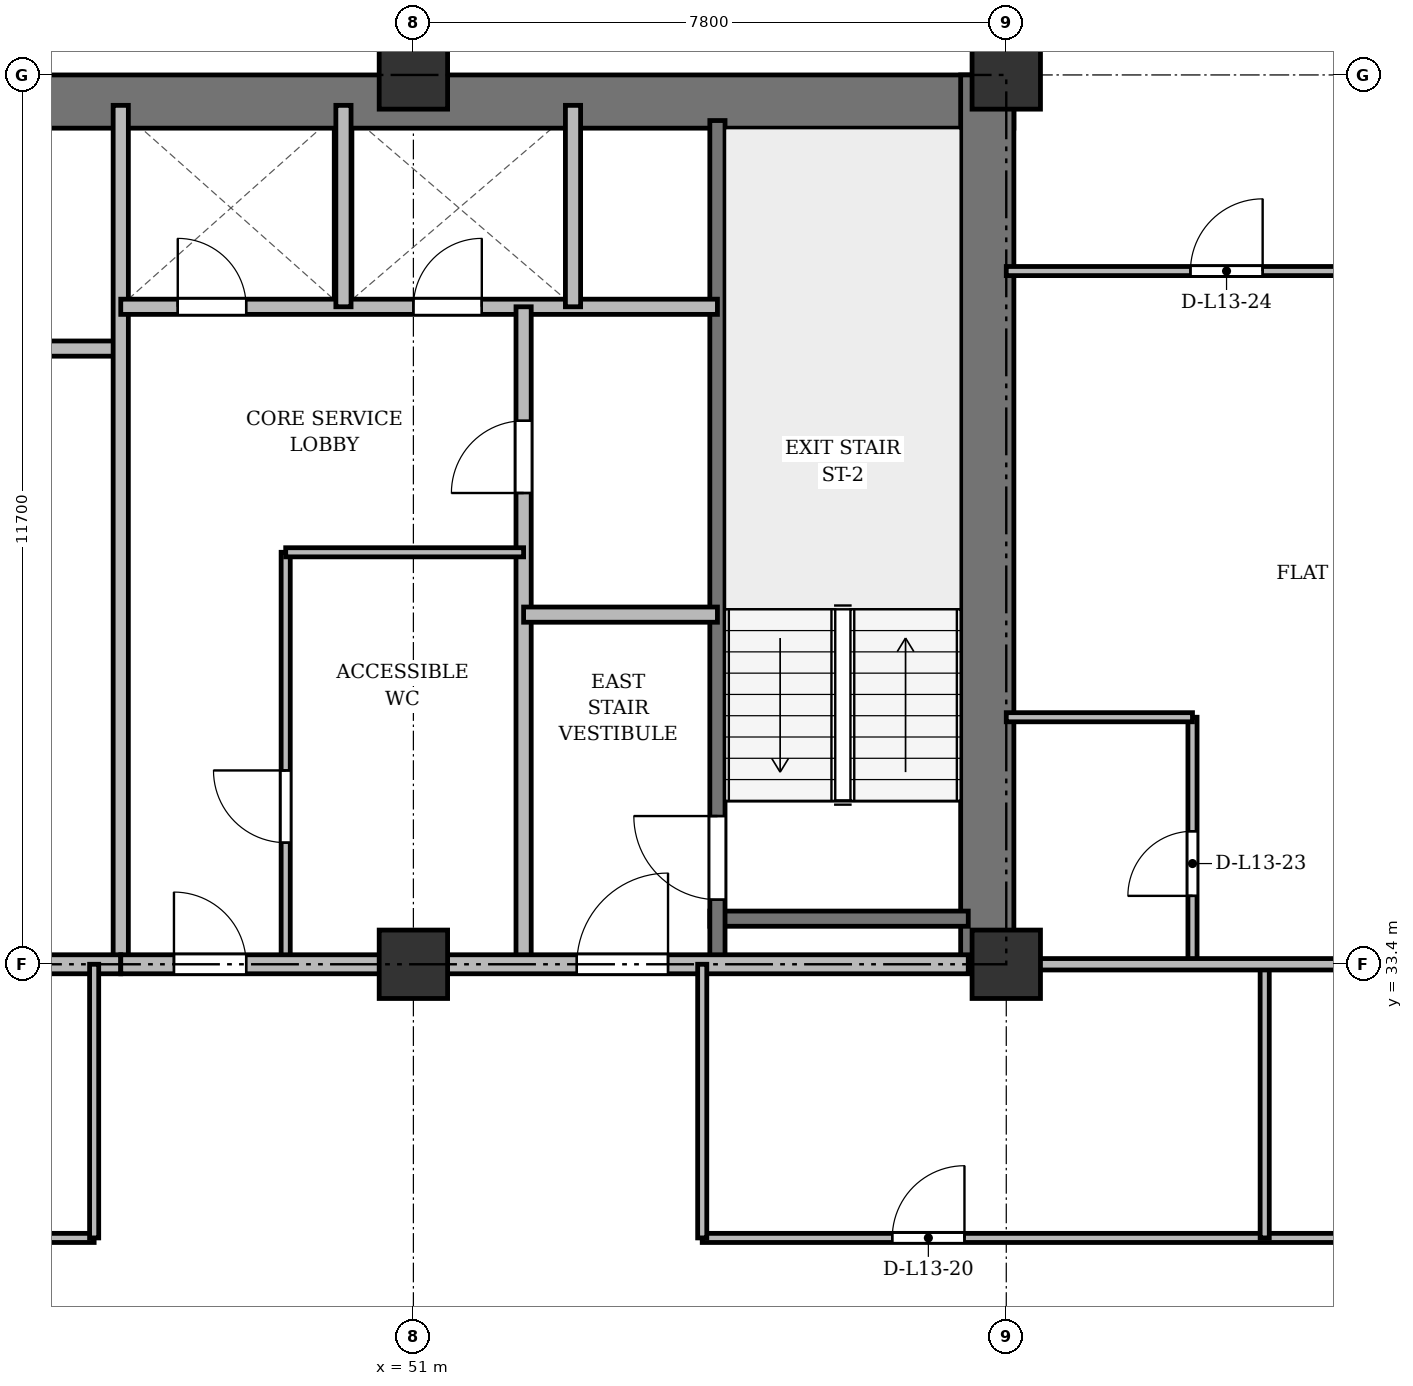
"""IFC4 building model, lengths in metres.
Left out: names, types, materials, properties, quantities, classifications, styles, units other than length and angle.
Written with IfcOpenShell. Run it as: python <this file> out.ifc"""

import sys

from ifc_helpers import new_model, si_unit, direction, frame, frame_2d, origin, origin_2d, place, context, subcontext, project, spatial, rectangle, extrude, source, transform, mapped, element, fill, save


model = new_model("IFC4")
c1 = context("Model", 3, precision=1e-05, world=origin(), true_north=direction((0.0, 1.0)))
c2 = subcontext(c1, "Body", "Model", "MODEL_VIEW")
j1 = project(units=[si_unit("LENGTHUNIT", "METRE"), si_unit("PLANEANGLEUNIT", "RADIAN")], contexts=[c1])
p1 = place(None, origin())
s1 = spatial("IfcSite", under=j1, at=p1, CompositionType="ELEMENT")
p2 = place(p1, origin())
s2 = spatial("IfcBuilding", under=s1, at=p2, CompositionType="ELEMENT")
p3 = place(p2, frame((0.0, 0.0, 52.3)))
s3 = spatial("IfcBuildingStorey", under=s2, at=p3, CompositionType="ELEMENT", Elevation=52.3)
m1 = source(origin(), c2, "Body", "SweptSolid", [
    extrude(rectangle(XDim=0.9, YDim=0.9, at=origin_2d()), origin(), (0.0, 0.0, 1.0), 3.6),
])
for number, where, z_axis, x_axis in (
    (1, (51.0, 33.4, 0.0), (0.0, 0.0, 1.0), (1.0, 0.0, 0.0)),
    (2, (51.0, 45.1, 0.0), (0.0, 0.0, 1.0), (1.0, 0.0, 0.0)),
    (3, (58.8, 33.4, 0.0), (0.0, 0.0, 1.0), (1.0, 0.0, 0.0)),
    (4, (58.8, 45.1, 0.0), (0.0, 0.0, 1.0), (1.0, 0.0, 0.0)),
):
    element("IfcColumn", number, at=place(p3, frame(where, z_axis=z_axis, x_axis=x_axis)), inside=s3, PredefinedType="COLUMN", context=c2, shape_type="MappedRepresentation", body=[
        mapped(m1, transform((0.0, 0.0, 0.0), x_axis=(1.0, 0.0, 0.0), y_axis=(0.0, 1.0, 0.0), z_axis=(0.0, 0.0, 1.0), scale=1.0)),
    ])
p4 = place(p3, frame((15.5, 44.75, 0.0), z_axis=(0.0, 0.0, 1.0), x_axis=(1.0, 0.0, 0.0)))
e5 = element("IfcWall", 5, at=p4, inside=s3, PredefinedType="SHEAR", context=c2, shape_type="SweptSolid", body=[
    extrude(rectangle(XDim=43.4, YDim=0.7, at=frame_2d((21.7, 0.0))), origin(), (0.0, 0.0, 1.0), 3.34),
])
p5 = place(p3, frame((58.55, 33.4, 0.0), z_axis=(0.0, 0.0, 1.0), x_axis=(0.0, 1.0, 0.0)))
e6 = element("IfcWall", 6, at=p5, inside=s3, PredefinedType="SHEAR", context=c2, shape_type="SweptSolid", body=[
    extrude(rectangle(XDim=11.7, YDim=0.7, at=frame_2d((5.85, 0.0))), origin(), (0.0, 0.0, 1.0), 3.34),
])
p6 = place(p3, frame((54.9, 34.0, 0.0), z_axis=(0.0, 0.0, 1.0), x_axis=(1.0, 0.0, 0.0)))
e7 = element("IfcWall", 7, at=p6, inside=s3, PredefinedType="SHEAR", context=c2, shape_type="SweptSolid", body=[
    extrude(rectangle(XDim=3.4, YDim=0.2, at=frame_2d((1.7, 0.0))), origin(), (0.0, 0.0, 1.0), 3.34),
])
p7 = place(p3, frame((55.0, 33.4, 0.0), z_axis=(0.0, 0.0, 1.0), x_axis=(0.0, 1.0, 0.0)))
e8 = element("IfcWall", 8, at=p7, inside=s3, PredefinedType="SHEAR", context=c2, shape_type="SweptSolid", body=[
    extrude(rectangle(XDim=11.1, YDim=0.2, at=frame_2d((5.55, 0.0))), origin(), (0.0, 0.0, 1.0), 3.34),
])
p8 = place(p7, frame((0.85, 0.0, 0.0)))
e9 = element("IfcOpeningElement", 9, at=p8, cuts=e8, PredefinedType="OPENING", context=c2, shape_type="SweptSolid", body=[
    extrude(rectangle(XDim=1.1, YDim=2.15, at=frame_2d((0.55, 1.075))), frame((0.0, 0.11, 0.0), z_axis=(0.0, -1.0, 0.0), x_axis=(1.0, 0.0, 0.0)), (0.0, 0.0, 1.0), 0.22),
])
p9 = place(p3, frame((40.25, 41.5, 0.0), z_axis=(0.0, 0.0, 1.0), x_axis=(1.0, 0.0, 0.0)))
e10 = element("IfcWall", 10, at=p9, inside=s3, PredefinedType="SOLIDWALL", context=c2, shape_type="SweptSolid", body=[
    extrude(rectangle(XDim=6.9, YDim=0.2, at=frame_2d((3.45, 0.0))), origin(), (0.0, 0.0, 1.0), 2.752),
])
p10 = place(p3, frame((47.15, 33.4, 0.0), z_axis=(0.0, 0.0, 1.0), x_axis=(0.0, 1.0, 0.0)))
e11 = element("IfcWall", 11, at=p10, inside=s3, PredefinedType="SOLIDWALL", context=c2, shape_type="SweptSolid", body=[
    extrude(rectangle(XDim=11.3, YDim=0.2, at=frame_2d((5.65, 0.0))), origin(), (0.0, 0.0, 1.0), 2.69),
])
p11 = place(p3, frame((26.3, 33.4, 0.0), z_axis=(0.0, 0.0, 1.0), x_axis=(1.0, 0.0, 0.0)))
e12 = element("IfcWall", 12, at=p11, inside=s3, PredefinedType="PARTITIONING", context=c2, shape_type="SweptSolid", body=[
    extrude(rectangle(XDim=20.85, YDim=0.25, at=frame_2d((10.425, 0.0))), origin(), (0.0, 0.0, 1.0), 2.69),
])
p12 = place(p11, frame((9.2, 0.0, 0.0)))
e13 = element("IfcOpeningElement", 13, at=p12, cuts=e12, PredefinedType="OPENING", context=c2, shape_type="SweptSolid", body=[
    extrude(rectangle(XDim=1.6, YDim=2.2, at=frame_2d((0.8, 1.1))), frame((0.0, 0.135, 0.0), z_axis=(0.0, -1.0, 0.0), x_axis=(1.0, 0.0, 0.0)), (0.0, 0.0, 1.0), 0.27),
])
p13 = place(p3, frame((47.15, 42.05, 0.0), z_axis=(0.0, 0.0, 1.0), x_axis=(1.0, 0.0, 0.0)))
e14 = element("IfcWall", 14, at=p13, inside=s3, PredefinedType="SOLIDWALL", context=c2, shape_type="SweptSolid", body=[
    extrude(rectangle(XDim=7.85, YDim=0.2, at=frame_2d((3.925, 0.0))), origin(), (0.0, 0.0, 1.0), 2.752),
])
p14 = place(p13, frame((0.75, 0.0, 0.0)))
e15 = element("IfcOpeningElement", 15, at=p14, cuts=e14, PredefinedType="OPENING", context=c2, shape_type="SweptSolid", body=[
    extrude(rectangle(XDim=0.9, YDim=2.1, at=frame_2d((0.45, 1.05))), frame((0.0, 0.11, 0.0), z_axis=(0.0, -1.0, 0.0), x_axis=(1.0, 0.0, 0.0)), (0.0, 0.0, 1.0), 0.22),
])
p15 = place(p13, frame((3.85, 0.0, 0.0)))
e16 = element("IfcOpeningElement", 16, at=p15, cuts=e14, PredefinedType="OPENING", context=c2, shape_type="SweptSolid", body=[
    extrude(rectangle(XDim=0.9, YDim=2.1, at=frame_2d((0.45, 1.05))), frame((0.0, 0.11, 0.0), z_axis=(0.0, -1.0, 0.0), x_axis=(1.0, 0.0, 0.0)), (0.0, 0.0, 1.0), 0.22),
])
for number, where, z_axis, x_axis in (
    (17, (50.08, 42.05, 0.0), (0.0, 0.0, 1.0), (0.0, 1.0, 0.0)),
    (18, (53.1, 42.05, 0.0), (0.0, 0.0, 1.0), (0.0, 1.0, 0.0)),
):
    element("IfcWall", number, at=place(p3, frame(where, z_axis=z_axis, x_axis=x_axis)), inside=s3, PredefinedType="SOLIDWALL", context=c2, shape_type="SweptSolid", body=[
        extrude(rectangle(XDim=2.65, YDim=0.2, at=frame_2d((1.325, 0.0))), origin(), (0.0, 0.0, 1.0), 3.34),
    ])
p16 = place(p3, frame((52.45, 33.4, 0.0), z_axis=(0.0, 0.0, 1.0), x_axis=(0.0, 1.0, 0.0)))
e19 = element("IfcWall", 19, at=p16, inside=s3, PredefinedType="PARTITIONING", context=c2, shape_type="SweptSolid", body=[
    extrude(rectangle(XDim=8.65, YDim=0.2, at=frame_2d((4.325, 0.0))), origin(), (0.0, 0.0, 1.0), 2.69),
])
p17 = place(p16, frame((6.2, 0.0, 0.0)))
e20 = element("IfcOpeningElement", 20, at=p17, cuts=e19, PredefinedType="OPENING", context=c2, shape_type="SweptSolid", body=[
    extrude(rectangle(XDim=0.95, YDim=2.15, at=frame_2d((0.475, 1.075))), frame((0.0, 0.11, 0.0), z_axis=(0.0, -1.0, 0.0), x_axis=(1.0, 0.0, 0.0)), (0.0, 0.0, 1.0), 0.22),
])
p18 = place(p3, frame((52.45, 38.0, 0.0), z_axis=(0.0, 0.0, 1.0), x_axis=(1.0, 0.0, 0.0)))
e21 = element("IfcWall", 21, at=p18, inside=s3, PredefinedType="PARTITIONING", context=c2, shape_type="SweptSolid", body=[
    extrude(rectangle(XDim=2.55, YDim=0.2, at=frame_2d((1.275, 0.0))), origin(), (0.0, 0.0, 1.0), 3.34),
])
p19 = place(p3, frame((49.32, 33.4, 0.0), z_axis=(0.0, 0.0, 1.0), x_axis=(0.0, 1.0, 0.0)))
e22 = element("IfcWall", 22, at=p19, inside=s3, PredefinedType="PARTITIONING", context=c2, shape_type="SweptSolid", body=[
    extrude(rectangle(XDim=5.42, YDim=0.12, at=frame_2d((2.71, 0.0))), origin(), (0.0, 0.0, 1.0), 2.69),
])
p20 = place(p19, frame((1.6, 0.0, 0.0)))
e23 = element("IfcOpeningElement", 23, at=p20, cuts=e22, PredefinedType="OPENING", context=c2, shape_type="SweptSolid", body=[
    extrude(rectangle(XDim=0.95, YDim=2.15, at=frame_2d((0.475, 1.075))), frame((0.0, 0.07, 0.0), z_axis=(0.0, -1.0, 0.0), x_axis=(1.0, 0.0, 0.0)), (0.0, 0.0, 1.0), 0.14),
])
p21 = place(p3, frame((49.32, 38.82, 0.0), z_axis=(0.0, 0.0, 1.0), x_axis=(1.0, 0.0, 0.0)))
e24 = element("IfcWall", 24, at=p21, inside=s3, PredefinedType="PARTITIONING", context=c2, shape_type="SweptSolid", body=[
    extrude(rectangle(XDim=3.13, YDim=0.12, at=frame_2d((1.565, 0.0))), origin(), (0.0, 0.0, 1.0), 2.752),
])
p22 = place(p3, frame((47.15, 33.4, 0.0), z_axis=(0.0, 0.0, 1.0), x_axis=(1.0, 0.0, 0.0)))
e25 = element("IfcWall", 25, at=p22, inside=s3, PredefinedType="PARTITIONING", context=c2, shape_type="SweptSolid", body=[
    extrude(rectangle(XDim=11.15, YDim=0.25, at=frame_2d((5.575, 0.0))), origin(), (0.0, 0.0, 1.0), 2.69),
])
p23 = place(p22, frame((0.7, 0.0, 0.0)))
e26 = element("IfcOpeningElement", 26, at=p23, cuts=e25, PredefinedType="OPENING", context=c2, shape_type="SweptSolid", body=[
    extrude(rectangle(XDim=0.95, YDim=2.15, at=frame_2d((0.475, 1.075))), frame((0.0, 0.135, 0.0), z_axis=(0.0, -1.0, 0.0), x_axis=(1.0, 0.0, 0.0)), (0.0, 0.0, 1.0), 0.27),
])
p24 = place(p22, frame((6.0, 0.0, 0.0)))
e27 = element("IfcOpeningElement", 27, at=p24, cuts=e25, PredefinedType="OPENING", context=c2, shape_type="SweptSolid", body=[
    extrude(rectangle(XDim=1.2, YDim=2.15, at=frame_2d((0.6, 1.075))), frame((0.0, 0.135, 0.0), z_axis=(0.0, -1.0, 0.0), x_axis=(1.0, 0.0, 0.0)), (0.0, 0.0, 1.0), 0.27),
])
p25 = place(p3, frame((38.2, 29.8, 0.0), z_axis=(0.0, 0.0, 1.0), x_axis=(1.0, 0.0, 0.0)))
e28 = element("IfcWall", 28, at=p25, inside=s3, PredefinedType="PARTITIONING", context=c2, shape_type="SweptSolid", body=[
    extrude(rectangle(XDim=8.6, YDim=0.12, at=frame_2d((4.3, 0.0))), origin(), (0.0, 0.0, 1.0), 2.752),
])
p26 = place(p25, frame((3.462, 0.0, 0.0)))
e29 = element("IfcOpeningElement", 29, at=p26, cuts=e28, PredefinedType="OPENING", context=c2, shape_type="SweptSolid", body=[
    extrude(rectangle(XDim=0.95, YDim=2.15, at=frame_2d((0.475, 1.075))), frame((0.0, 0.07, 0.0), z_axis=(0.0, -1.0, 0.0), x_axis=(1.0, 0.0, 0.0)), (0.0, 0.0, 1.0), 0.14),
])
p27 = place(p3, frame((54.8, 29.8, 0.0), z_axis=(0.0, 0.0, 1.0), x_axis=(1.0, 0.0, 0.0)))
e30 = element("IfcWall", 30, at=p27, inside=s3, PredefinedType="PARTITIONING", context=c2, shape_type="SweptSolid", body=[
    extrude(rectangle(XDim=14.85, YDim=0.12, at=frame_2d((7.425, 0.0))), origin(), (0.0, 0.0, 1.0), 2.752),
])
p28 = place(p27, frame((2.5, 0.0, 0.0)))
e31 = element("IfcOpeningElement", 31, at=p28, cuts=e30, PredefinedType="OPENING", context=c2, shape_type="SweptSolid", body=[
    extrude(rectangle(XDim=0.95, YDim=2.15, at=frame_2d((0.475, 1.075))), frame((0.0, 0.07, 0.0), z_axis=(0.0, -1.0, 0.0), x_axis=(1.0, 0.0, 0.0)), (0.0, 0.0, 1.0), 0.14),
])
p29 = place(p27, frame((9.2, 0.0, 0.0)))
e32 = element("IfcOpeningElement", 32, at=p29, cuts=e30, PredefinedType="OPENING", context=c2, shape_type="SweptSolid", body=[
    extrude(rectangle(XDim=0.95, YDim=2.15, at=frame_2d((0.475, 1.075))), frame((0.0, 0.07, 0.0), z_axis=(0.0, -1.0, 0.0), x_axis=(1.0, 0.0, 0.0)), (0.0, 0.0, 1.0), 0.14),
])
for number, where, z_axis, x_axis in (
    (33, (62.2, 29.8, 0.0), (0.0, 0.0, 1.0), (0.0, 1.0, 0.0)),
    (34, (46.8, 29.8, 0.0), (0.0, 0.0, 1.0), (0.0, 1.0, 0.0)),
    (35, (54.8, 29.8, 0.0), (0.0, 0.0, 1.0), (0.0, 1.0, 0.0)),
):
    element("IfcWall", number, at=place(p3, frame(where, z_axis=z_axis, x_axis=x_axis)), inside=s3, PredefinedType="PARTITIONING", context=c2, shape_type="SweptSolid", body=[
        extrude(rectangle(XDim=3.6, YDim=0.12, at=frame_2d((1.8, 0.0))), origin(), (0.0, 0.0, 1.0), 2.69),
    ])
p30 = place(p3, frame((61.25, 33.4, 0.0), z_axis=(0.0, 0.0, 1.0), x_axis=(0.0, 1.0, 0.0)))
e36 = element("IfcWall", 36, at=p30, inside=s3, PredefinedType="PARTITIONING", context=c2, shape_type="SweptSolid", body=[
    extrude(rectangle(XDim=3.25, YDim=0.12, at=frame_2d((1.625, 0.0))), origin(), (0.0, 0.0, 1.0), 2.69),
])
p31 = place(p30, frame((0.9, 0.0, 0.0)))
e37 = element("IfcOpeningElement", 37, at=p31, cuts=e36, PredefinedType="OPENING", context=c2, shape_type="SweptSolid", body=[
    extrude(rectangle(XDim=0.85, YDim=2.1, at=frame_2d((0.425, 1.05))), frame((0.0, 0.07, 0.0), z_axis=(0.0, -1.0, 0.0), x_axis=(1.0, 0.0, 0.0)), (0.0, 0.0, 1.0), 0.14),
])
p32 = place(p3, frame((58.8, 36.65, 0.0), z_axis=(0.0, 0.0, 1.0), x_axis=(1.0, 0.0, 0.0)))
e38 = element("IfcWall", 38, at=p32, inside=s3, PredefinedType="PARTITIONING", context=c2, shape_type="SweptSolid", body=[
    extrude(rectangle(XDim=2.45, YDim=0.12, at=frame_2d((1.225, 0.0))), origin(), (0.0, 0.0, 1.0), 2.752),
])
p33 = place(p3, frame((58.8, 42.52, 0.0), z_axis=(0.0, 0.0, 1.0), x_axis=(1.0, 0.0, 0.0)))
e39 = element("IfcWall", 39, at=p33, inside=s3, PredefinedType="PARTITIONING", context=c2, shape_type="SweptSolid", body=[
    extrude(rectangle(XDim=5.425, YDim=0.12, at=frame_2d((2.712, 0.0))), origin(), (0.0, 0.0, 1.0), 2.752),
])
p34 = place(p33, frame((2.423, 0.0, 0.0)))
e40 = element("IfcOpeningElement", 40, at=p34, cuts=e39, PredefinedType="OPENING", context=c2, shape_type="SweptSolid", body=[
    extrude(rectangle(XDim=0.95, YDim=2.15, at=frame_2d((0.475, 1.075))), frame((0.0, 0.07, 0.0), z_axis=(0.0, -1.0, 0.0), x_axis=(1.0, 0.0, 0.0)), (0.0, 0.0, 1.0), 0.14),
])
p35 = place(p3, frame((58.8, 33.4, 0.0), z_axis=(0.0, 0.0, 1.0), x_axis=(1.0, 0.0, 0.0)))
e41 = element("IfcWall", 41, at=p35, inside=s3, PredefinedType="PARTITIONING", context=c2, shape_type="SweptSolid", body=[
    extrude(rectangle(XDim=10.85, YDim=0.15, at=frame_2d((5.425, 0.0))), origin(), (0.0, 0.0, 1.0), 2.69),
])
p36 = place(p35, frame((4.933, 0.0, 0.0)))
e42 = element("IfcOpeningElement", 42, at=p36, cuts=e41, PredefinedType="OPENING", context=c2, shape_type="SweptSolid", body=[
    extrude(rectangle(XDim=0.95, YDim=2.15, at=frame_2d((0.475, 1.075))), frame((0.0, 0.085, 0.0), z_axis=(0.0, -1.0, 0.0), x_axis=(1.0, 0.0, 0.0)), (0.0, 0.0, 1.0), 0.17),
])
p37 = place(p3, frame((58.8, 44.75, 0.0), z_axis=(0.0, 0.0, 1.0), x_axis=(0.0, 1.0, 0.0)))
e43 = element("IfcWall", 43, at=p37, inside=s3, PredefinedType="PARTITIONING", context=c2, shape_type="SweptSolid", body=[
    extrude(rectangle(XDim=3.61, YDim=0.15, at=frame_2d((1.805, 0.0))), origin(), (0.0, 0.0, 1.0), 2.752),
])
p38 = place(p37, frame((1.1, 0.0, 0.0)))
e44 = element("IfcOpeningElement", 44, at=p38, cuts=e43, PredefinedType="OPENING", context=c2, shape_type="SweptSolid", body=[
    extrude(rectangle(XDim=0.95, YDim=2.15, at=frame_2d((0.475, 1.075))), frame((0.0, 0.085, 0.0), z_axis=(0.0, -1.0, 0.0), x_axis=(1.0, 0.0, 0.0)), (0.0, 0.0, 1.0), 0.17),
])
m2 = source(origin(), c2, "Body", "SweptSolid", [
    extrude(rectangle(XDim=1.1, YDim=2.15, at=frame_2d((0.55, 1.075))), frame((0.0, 0.025, 0.0), z_axis=(0.0, -1.0, 0.0), x_axis=(1.0, 0.0, 0.0)), (0.0, 0.0, 1.0), 0.05),
])
p39 = place(p8, origin())
e45 = element("IfcDoor", 45, at=p39, inside=s3, OperationType="SINGLE_SWING_RIGHT", PredefinedType="DOOR", context=c2, shape_type="MappedRepresentation", body=[
    mapped(m2, transform((0.0, 0.0, 0.0), x_axis=(1.0, 0.0, 0.0), y_axis=(0.0, 1.0, 0.0), z_axis=(0.0, 0.0, 1.0), scale=1.0)),
])
fill(e9, e45)
m3 = source(origin(), c2, "Body", "SweptSolid", [
    extrude(rectangle(XDim=0.9, YDim=2.1, at=frame_2d((0.45, 1.05))), frame((0.0, 0.025, 0.0), z_axis=(0.0, -1.0, 0.0), x_axis=(1.0, 0.0, 0.0)), (0.0, 0.0, 1.0), 0.05),
])
p40 = place(p14, origin())
e46 = element("IfcDoor", 46, at=p40, inside=s3, OperationType="SINGLE_SWING_LEFT", PredefinedType="DOOR", context=c2, shape_type="MappedRepresentation", body=[
    mapped(m3, transform((0.0, 0.0, 0.0), x_axis=(1.0, 0.0, 0.0), y_axis=(0.0, 1.0, 0.0), z_axis=(0.0, 0.0, 1.0), scale=1.0)),
])
fill(e15, e46)
p41 = place(p15, origin())
e47 = element("IfcDoor", 47, at=p41, inside=s3, OperationType="SINGLE_SWING_RIGHT", PredefinedType="DOOR", context=c2, shape_type="MappedRepresentation", body=[
    mapped(m3, transform((0.0, 0.0, 0.0), x_axis=(1.0, 0.0, 0.0), y_axis=(0.0, 1.0, 0.0), z_axis=(0.0, 0.0, 1.0), scale=1.0)),
])
fill(e16, e47)
m4 = source(origin(), c2, "Body", "SweptSolid", [
    extrude(rectangle(XDim=0.95, YDim=2.15, at=frame_2d((0.475, 1.075))), frame((0.0, 0.025, 0.0), z_axis=(0.0, -1.0, 0.0), x_axis=(1.0, 0.0, 0.0)), (0.0, 0.0, 1.0), 0.05),
])
p42 = place(p17, origin())
e48 = element("IfcDoor", 48, at=p42, inside=s3, OperationType="SINGLE_SWING_LEFT", PredefinedType="DOOR", context=c2, shape_type="MappedRepresentation", body=[
    mapped(m4, transform((0.0, 0.0, 0.0), x_axis=(1.0, 0.0, 0.0), y_axis=(0.0, 1.0, 0.0), z_axis=(0.0, 0.0, 1.0), scale=1.0)),
])
fill(e20, e48)
p43 = place(p20, origin())
e49 = element("IfcDoor", 49, at=p43, inside=s3, OperationType="SINGLE_SWING_RIGHT", PredefinedType="DOOR", context=c2, shape_type="MappedRepresentation", body=[
    mapped(m4, transform((0.0, 0.0, 0.0), x_axis=(1.0, 0.0, 0.0), y_axis=(0.0, 1.0, 0.0), z_axis=(0.0, 0.0, 1.0), scale=1.0)),
])
fill(e23, e49)
p44 = place(p23, origin())
e50 = element("IfcDoor", 50, at=p44, inside=s3, OperationType="SINGLE_SWING_LEFT", PredefinedType="DOOR", context=c2, shape_type="MappedRepresentation", body=[
    mapped(m4, transform((0.0, 0.0, 0.0), x_axis=(1.0, 0.0, 0.0), y_axis=(0.0, 1.0, 0.0), z_axis=(0.0, 0.0, 1.0), scale=1.0)),
])
fill(e26, e50)
m5 = source(origin(), c2, "Body", "SweptSolid", [
    extrude(rectangle(XDim=1.2, YDim=2.15, at=frame_2d((0.6, 1.075))), frame((0.0, 0.025, 0.0), z_axis=(0.0, -1.0, 0.0), x_axis=(1.0, 0.0, 0.0)), (0.0, 0.0, 1.0), 0.05),
])
p45 = place(p24, origin())
e51 = element("IfcDoor", 51, at=p45, inside=s3, OperationType="SINGLE_SWING_RIGHT", PredefinedType="DOOR", context=c2, shape_type="MappedRepresentation", body=[
    mapped(m5, transform((0.0, 0.0, 0.0), x_axis=(1.0, 0.0, 0.0), y_axis=(0.0, 1.0, 0.0), z_axis=(0.0, 0.0, 1.0), scale=1.0)),
])
fill(e27, e51)
p46 = place(p28, origin())
e52 = element("IfcDoor", 52, at=p46, inside=s3, OperationType="SINGLE_SWING_RIGHT", PredefinedType="DOOR", context=c2, shape_type="MappedRepresentation", body=[
    mapped(m4, transform((0.0, 0.0, 0.0), x_axis=(1.0, 0.0, 0.0), y_axis=(0.0, 1.0, 0.0), z_axis=(0.0, 0.0, 1.0), scale=1.0)),
])
fill(e31, e52)
m6 = source(origin(), c2, "Body", "SweptSolid", [
    extrude(rectangle(XDim=0.85, YDim=2.1, at=frame_2d((0.425, 1.05))), frame((0.0, 0.025, 0.0), z_axis=(0.0, -1.0, 0.0), x_axis=(1.0, 0.0, 0.0)), (0.0, 0.0, 1.0), 0.05),
])
p47 = place(p31, origin())
e53 = element("IfcDoor", 53, at=p47, inside=s3, OperationType="SINGLE_SWING_LEFT", PredefinedType="DOOR", context=c2, shape_type="MappedRepresentation", body=[
    mapped(m6, transform((0.0, 0.0, 0.0), x_axis=(1.0, 0.0, 0.0), y_axis=(0.0, 1.0, 0.0), z_axis=(0.0, 0.0, 1.0), scale=1.0)),
])
fill(e37, e53)
p48 = place(p34, origin())
e54 = element("IfcDoor", 54, at=p48, inside=s3, OperationType="SINGLE_SWING_RIGHT", PredefinedType="DOOR", context=c2, shape_type="MappedRepresentation", body=[
    mapped(m4, transform((0.0, 0.0, 0.0), x_axis=(1.0, 0.0, 0.0), y_axis=(0.0, 1.0, 0.0), z_axis=(0.0, 0.0, 1.0), scale=1.0)),
])
fill(e40, e54)
save(model, sys.argv[1])
